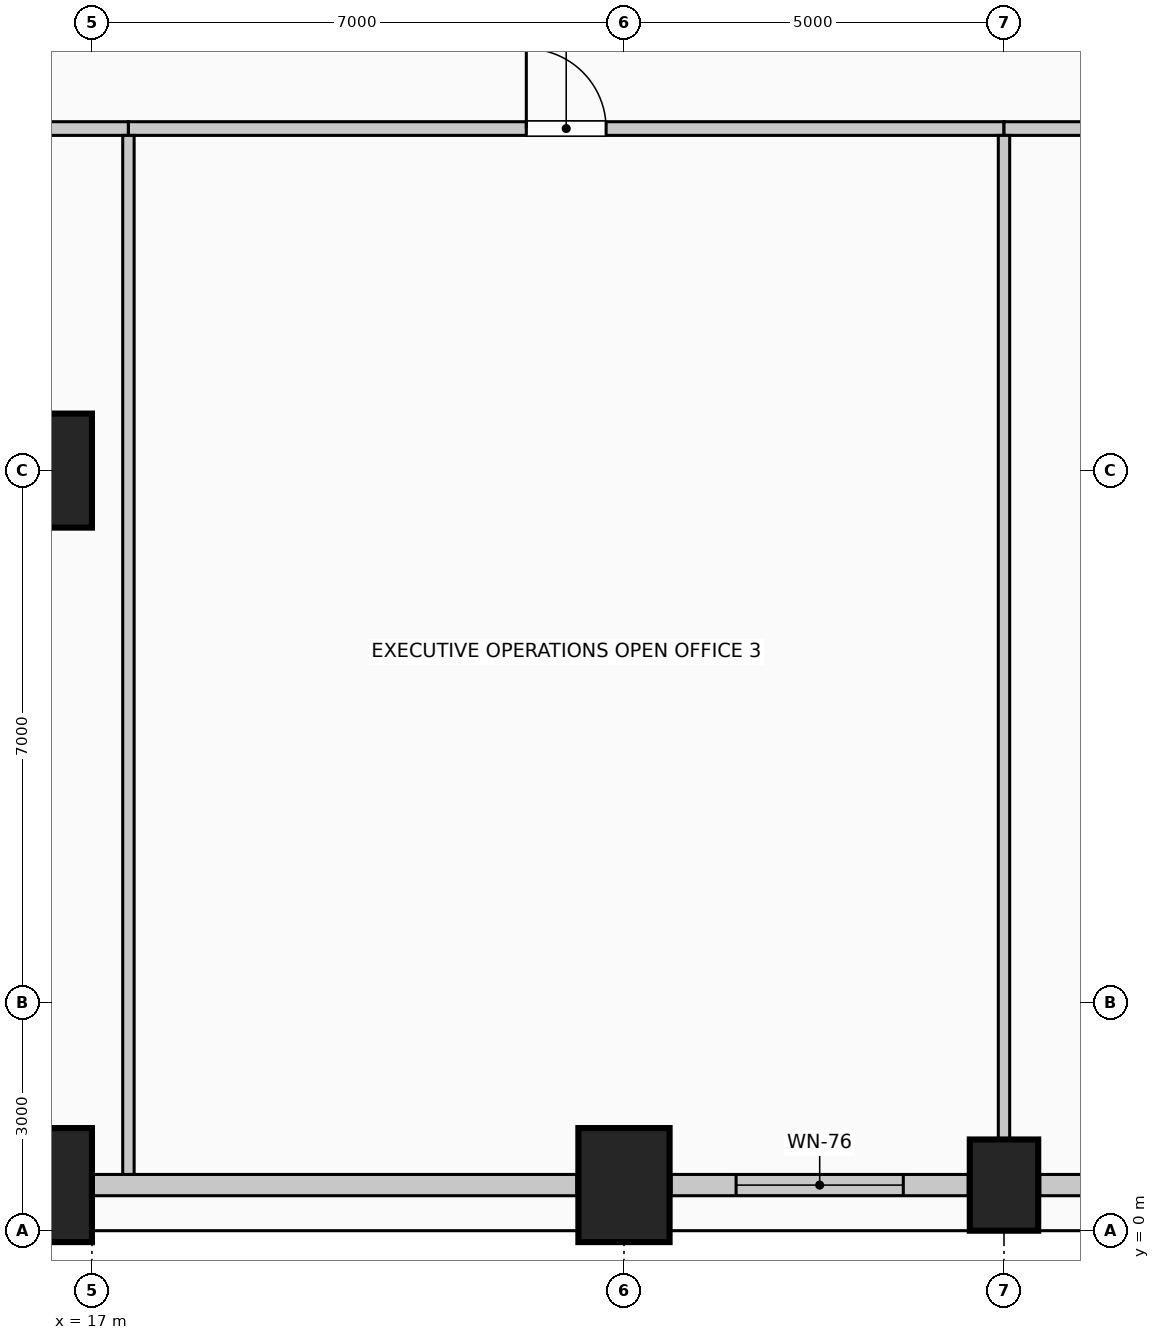
"""IFC4 building model, lengths in metres.
Left out: names, types, materials, properties, quantities, classifications, styles, units other than length and angle.
Written with IfcOpenShell. Run it as: python <this file> out.ifc"""

import sys

from ifc_helpers import new_model, si_unit, direction, frame, frame_2d, origin, origin_2d, place, context, subcontext, project, spatial, rectangle, extrude, element, fill, save


model = new_model("IFC4")
c1 = context("Model", 3, precision=1e-05, world=origin(), true_north=direction((0.0, 1.0)))
c2 = subcontext(c1, "Body", "Model", "MODEL_VIEW")
j1 = project(units=[si_unit("LENGTHUNIT", "METRE"), si_unit("PLANEANGLEUNIT", "RADIAN")], contexts=[c1])
p1 = place(None, origin())
s1 = spatial("IfcSite", under=j1, at=p1, CompositionType="ELEMENT")
p2 = place(p1, origin())
s2 = spatial("IfcBuilding", under=s1, at=p2, CompositionType="ELEMENT")
p3 = place(p2, frame((0.0, 0.0, 50.6)))
s3 = spatial("IfcBuildingStorey", under=s2, at=p3, CompositionType="ELEMENT", Elevation=50.6)
for number, where, z_axis, x_axis in (
    (1, (16.4, 0.6, 0.0), (0.0, 0.0, 1.0), (1.0, 0.0, 0.0)),
    (2, (24.0, 0.6, 0.0), (0.0, 0.0, 1.0), (1.0, 0.0, 0.0)),
):
    element("IfcColumn", number, at=place(p3, frame(where, z_axis=z_axis, x_axis=x_axis)), inside=s3, PredefinedType="COLUMN", context=c2, shape_type="SweptSolid", body=[
        extrude(rectangle(XDim=1.2, YDim=1.5, at=origin_2d()), origin(), (0.0, 0.0, 1.0), 4.0),
    ])
p4 = place(p3, frame((29.0, 0.6, 0.0), z_axis=(0.0, 0.0, 1.0), x_axis=(1.0, 0.0, 0.0)))
e3 = element("IfcColumn", 3, at=p4, inside=s3, PredefinedType="COLUMN", context=c2, shape_type="SweptSolid", body=[
    extrude(rectangle(XDim=0.9, YDim=1.2, at=origin_2d()), origin(), (0.0, 0.0, 1.0), 4.0),
])
p5 = place(p3, frame((16.4, 10.0, 0.0), z_axis=(0.0, 0.0, 1.0), x_axis=(1.0, 0.0, 0.0)))
e4 = element("IfcColumn", 4, at=p5, inside=s3, PredefinedType="COLUMN", context=c2, shape_type="SweptSolid", body=[
    extrude(rectangle(XDim=1.2, YDim=1.5, at=origin_2d()), origin(), (0.0, 0.0, 1.0), 4.0),
])
p6 = place(p3, frame((23.38, 0.6, 0.0), z_axis=(0.0, 0.0, 1.0), x_axis=(-1.0, 0.0, 0.0)))
e5 = element("IfcWall", 5, at=p6, inside=s3, PredefinedType="SOLIDWALL", context=c2, shape_type="SweptSolid", body=[
    extrude(rectangle(XDim=6.36, YDim=0.28, at=frame_2d((3.18, 0.0))), origin(), (0.0, 0.0, 1.0), 2.85),
])
p7 = place(p3, frame((28.53, 0.6, 0.0), z_axis=(0.0, 0.0, 1.0), x_axis=(-1.0, 0.0, 0.0)))
e6 = element("IfcWall", 6, at=p7, inside=s3, PredefinedType="SOLIDWALL", context=c2, shape_type="SweptSolid", body=[
    extrude(rectangle(XDim=3.91, YDim=0.28, at=frame_2d((1.955, 0.0))), origin(), (0.0, 0.0, 1.0), 2.85),
])
p8 = place(p7, frame((0.855, 0.0, 0.5)))
e7 = element("IfcOpeningElement", 7, at=p8, cuts=e6, PredefinedType="OPENING", context=c2, shape_type="SweptSolid", body=[
    extrude(rectangle(XDim=2.2, YDim=1.95, at=frame_2d((1.1, 0.975))), frame((0.0, 0.15, 0.0), z_axis=(0.0, -1.0, 0.0), x_axis=(1.0, 0.0, 0.0)), (0.0, 0.0, 1.0), 0.3),
])
p9 = place(p3, frame((33.38, 0.6, 0.0), z_axis=(0.0, 0.0, 1.0), x_axis=(-1.0, 0.0, 0.0)))
e8 = element("IfcWall", 8, at=p9, inside=s3, PredefinedType="SOLIDWALL", context=c2, shape_type="SweptSolid", body=[
    extrude(rectangle(XDim=3.91, YDim=0.28, at=frame_2d((1.955, 0.0))), origin(), (0.0, 0.0, 1.0), 2.85),
])
p10 = place(p9, frame((0.855, 0.0, 0.5)))
e9 = element("IfcOpeningElement", 9, at=p10, cuts=e8, PredefinedType="OPENING", context=c2, shape_type="SweptSolid", body=[
    extrude(rectangle(XDim=2.2, YDim=1.95, at=frame_2d((1.1, 0.975))), frame((0.0, 0.15, 0.0), z_axis=(0.0, -1.0, 0.0), x_axis=(1.0, 0.0, 0.0)), (0.0, 0.0, 1.0), 0.3),
])
p11 = place(p3, frame((12.94, 14.5, 0.0), z_axis=(0.0, 0.0, 1.0), x_axis=(1.0, 0.0, 0.0)))
e10 = element("IfcWall", 10, at=p11, inside=s3, PredefinedType="PARTITIONING", context=c2, shape_type="SweptSolid", body=[
    extrude(rectangle(XDim=4.54, YDim=0.18, at=frame_2d((2.27, 0.0))), origin(), (0.0, 0.0, 1.0), 3.7),
])
p12 = place(p11, frame((1.795, 0.0, 0.0)))
e11 = element("IfcOpeningElement", 11, at=p12, cuts=e10, PredefinedType="OPENING", context=c2, shape_type="SweptSolid", body=[
    extrude(rectangle(XDim=0.95, YDim=2.15, at=frame_2d((0.475, 1.075))), frame((0.0, 0.1, 0.0), z_axis=(0.0, -1.0, 0.0), x_axis=(1.0, 0.0, 0.0)), (0.0, 0.0, 1.0), 0.2),
])
p13 = place(p3, frame((17.48, 14.5, 0.0), z_axis=(0.0, 0.0, 1.0), x_axis=(1.0, 0.0, 0.0)))
e12 = element("IfcWall", 12, at=p13, inside=s3, PredefinedType="PARTITIONING", context=c2, shape_type="SweptSolid", body=[
    extrude(rectangle(XDim=11.52, YDim=0.18, at=frame_2d((5.76, 0.0))), origin(), (0.0, 0.0, 1.0), 3.7),
])
p14 = place(p13, frame((5.235, 0.0, 0.0)))
e13 = element("IfcOpeningElement", 13, at=p14, cuts=e12, PredefinedType="OPENING", context=c2, shape_type="SweptSolid", body=[
    extrude(rectangle(XDim=1.05, YDim=2.15, at=frame_2d((0.525, 1.075))), frame((0.0, 0.1, 0.0), z_axis=(0.0, -1.0, 0.0), x_axis=(1.0, 0.0, 0.0)), (0.0, 0.0, 1.0), 0.2),
])
p15 = place(p3, frame((29.0, 14.5, 0.0), z_axis=(0.0, 0.0, 1.0), x_axis=(1.0, 0.0, 0.0)))
e14 = element("IfcWall", 14, at=p15, inside=s3, PredefinedType="PARTITIONING", context=c2, shape_type="SweptSolid", body=[
    extrude(rectangle(XDim=12.6, YDim=0.18, at=frame_2d((6.3, 0.0))), origin(), (0.0, 0.0, 1.0), 3.7),
])
p16 = place(p15, frame((5.825, 0.0, 0.0)))
e15 = element("IfcOpeningElement", 15, at=p16, cuts=e14, PredefinedType="OPENING", context=c2, shape_type="SweptSolid", body=[
    extrude(rectangle(XDim=0.95, YDim=2.15, at=frame_2d((0.475, 1.075))), frame((0.0, 0.1, 0.0), z_axis=(0.0, -1.0, 0.0), x_axis=(1.0, 0.0, 0.0)), (0.0, 0.0, 1.0), 0.2),
])
p17 = place(p3, frame((17.48, 0.74, 0.0), z_axis=(0.0, 0.0, 1.0), x_axis=(0.0, 1.0, 0.0)))
e16 = element("IfcWall", 16, at=p17, inside=s3, PredefinedType="PARTITIONING", context=c2, shape_type="SweptSolid", body=[
    extrude(rectangle(XDim=13.67, YDim=0.15, at=frame_2d((6.835, 0.0))), origin(), (0.0, 0.0, 1.0), 3.7),
])
p18 = place(p3, frame((29.0, 1.2, 0.0), z_axis=(0.0, 0.0, 1.0), x_axis=(0.0, 1.0, 0.0)))
e17 = element("IfcWall", 17, at=p18, inside=s3, PredefinedType="PARTITIONING", context=c2, shape_type="SweptSolid", body=[
    extrude(rectangle(XDim=13.21, YDim=0.15, at=frame_2d((6.605, 0.0))), origin(), (0.0, 0.0, 1.0), 2.995),
])
p19 = place(p8, origin())
e18 = element("IfcWindow", 18, at=p19, inside=s3, PartitioningType="SINGLE_PANEL", PredefinedType="WINDOW", context=c2, shape_type="SweptSolid", body=[
    extrude(rectangle(XDim=2.2, YDim=1.95, at=frame_2d((1.1, 0.975))), frame((0.0, 0.03, 0.0), z_axis=(0.0, -1.0, 0.0), x_axis=(1.0, 0.0, 0.0)), (0.0, 0.0, 1.0), 0.06),
])
fill(e7, e18)
p20 = place(p14, origin())
e19 = element("IfcDoor", 19, at=p20, inside=s3, OperationType="SINGLE_SWING_LEFT", PredefinedType="DOOR", context=c2, shape_type="SweptSolid", body=[
    extrude(rectangle(XDim=1.05, YDim=2.15, at=frame_2d((0.525, 1.075))), frame((0.0, 0.025, 0.0), z_axis=(0.0, -1.0, 0.0), x_axis=(1.0, 0.0, 0.0)), (0.0, 0.0, 1.0), 0.05),
])
fill(e13, e19)
save(model, sys.argv[1])
